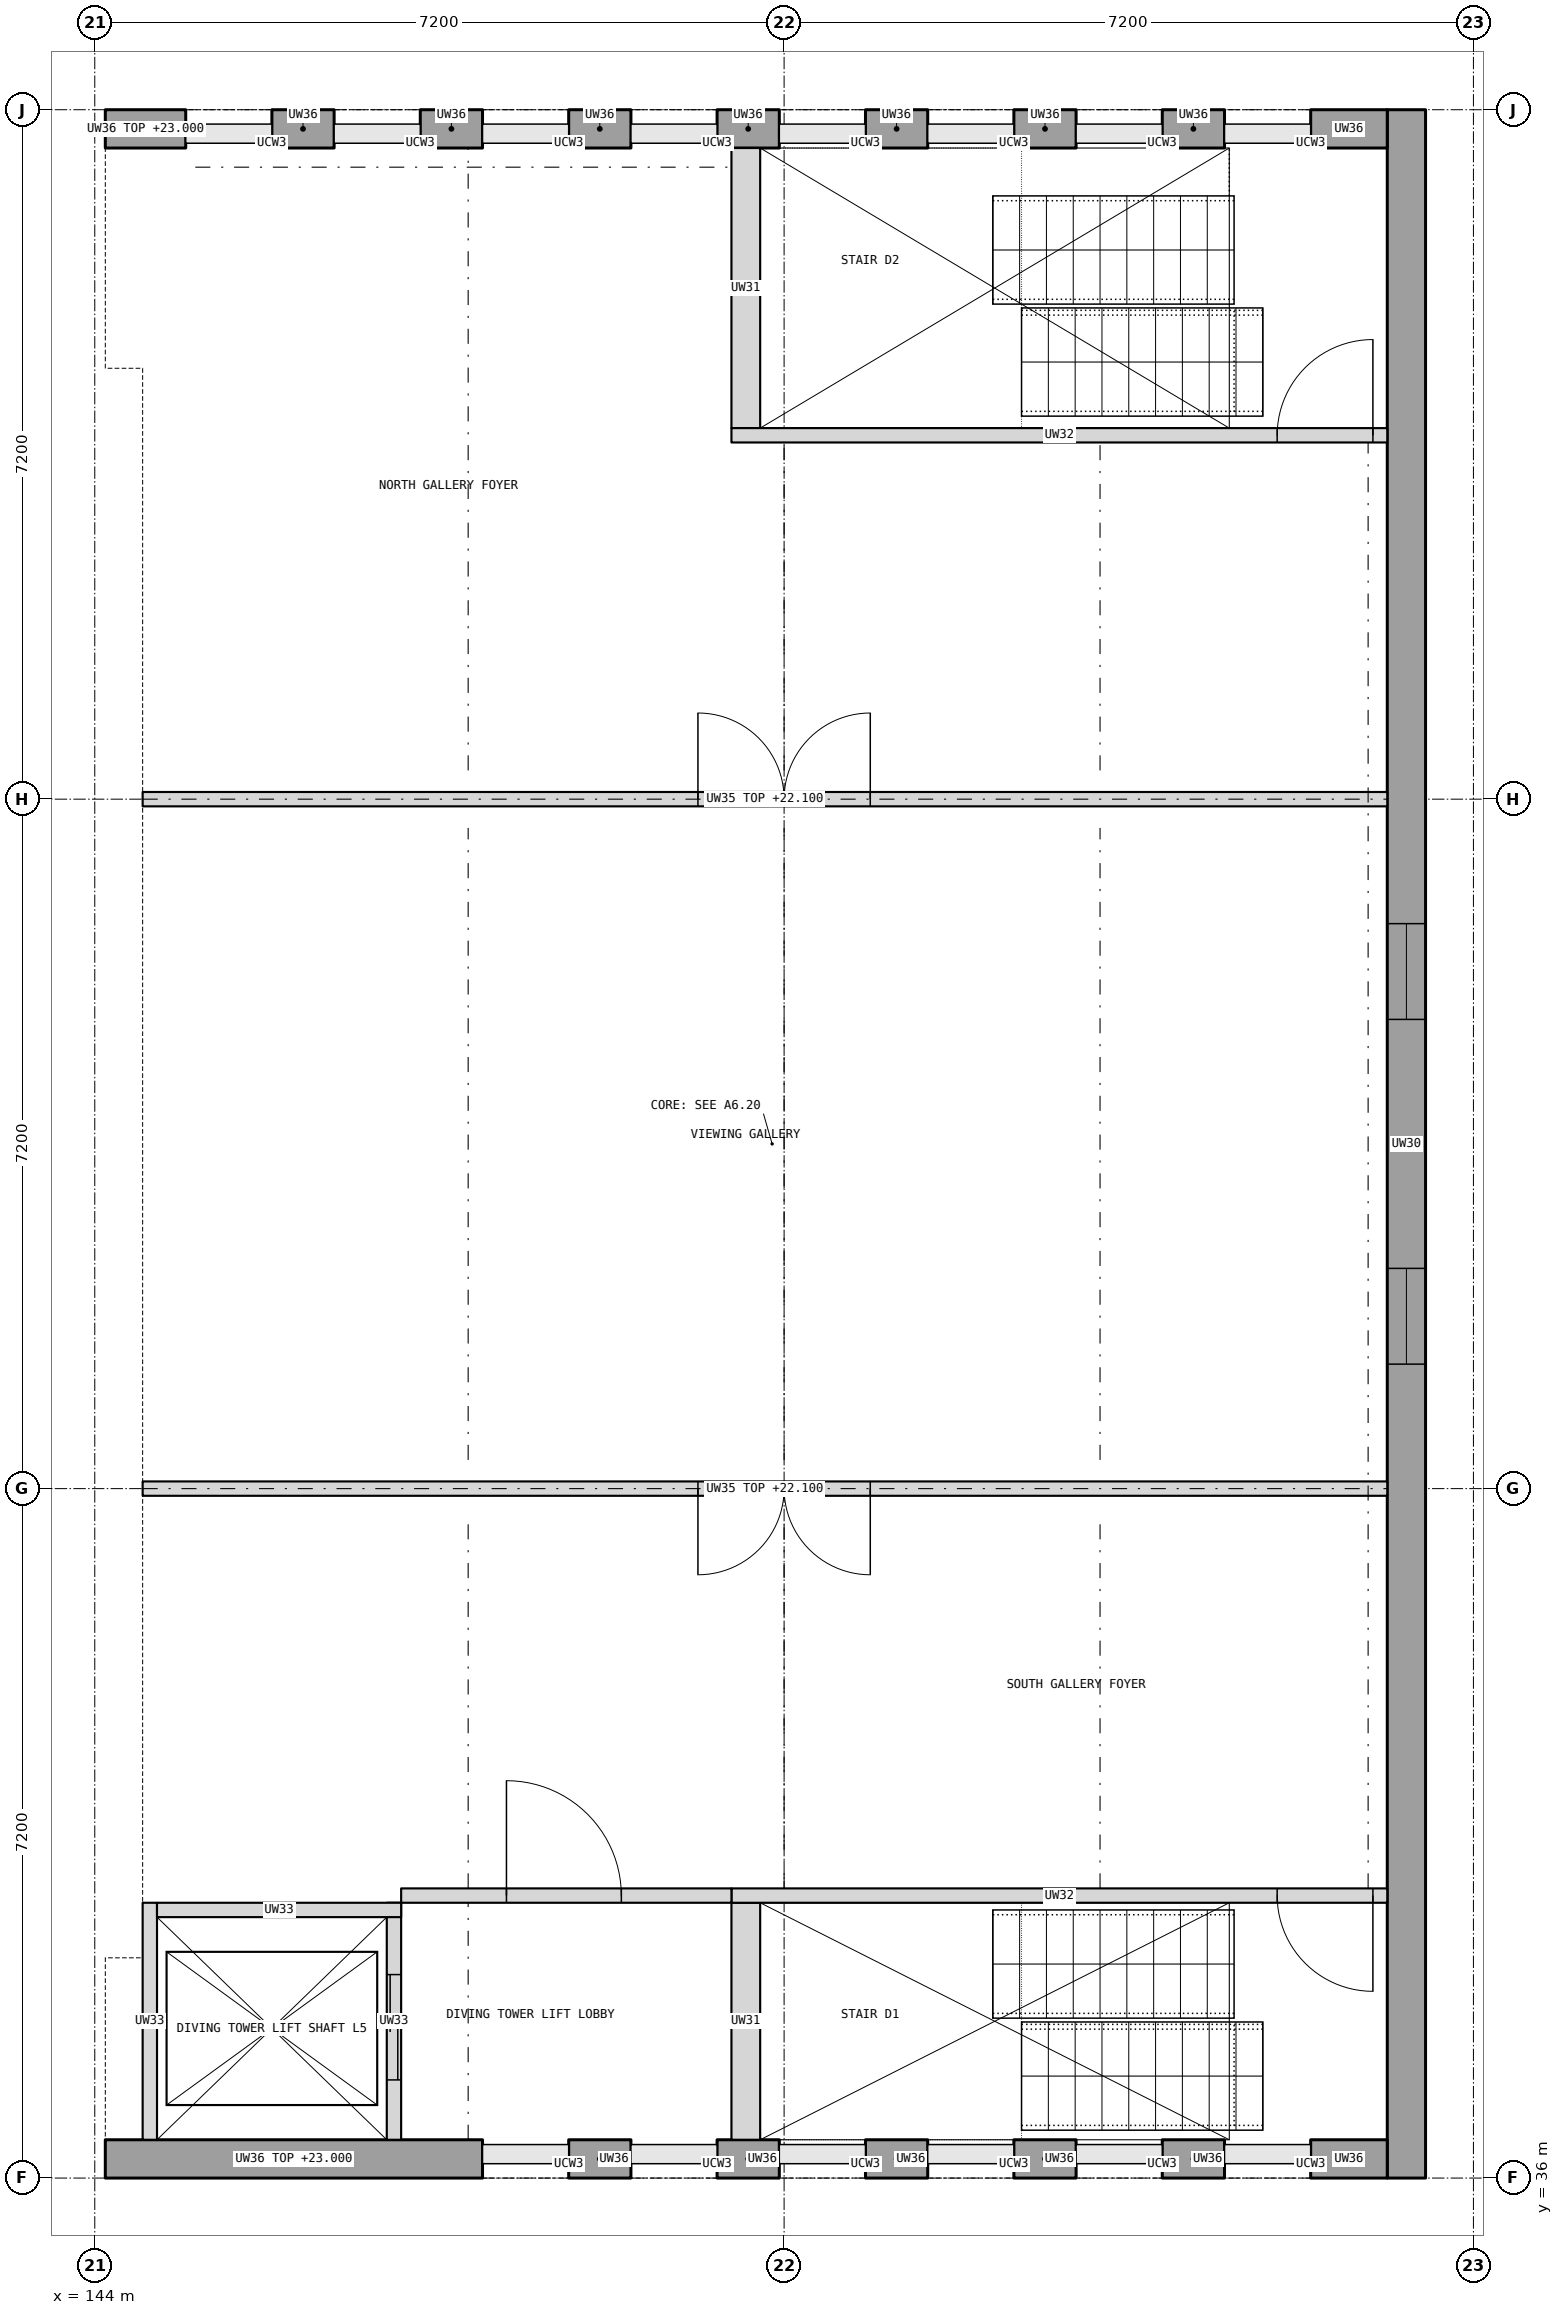
"""IFC4 building model, lengths in metres.
Left out: names, types, materials, properties, quantities, classifications, styles, units other than length and angle.
Written with IfcOpenShell. Run it as: python <this file> out.ifc"""

import sys

from ifc_helpers import new_model, si_unit, direction, frame, frame_2d, origin, place, context, subcontext, project, spatial, rectangle, extrude, element, fill, save


model = new_model("IFC4")
c1 = context("Model", 3, precision=1e-05, world=origin(), true_north=direction((0.0, 1.0)))
c2 = subcontext(c1, "Body", "Model", "MODEL_VIEW")
j1 = project(units=[si_unit("LENGTHUNIT", "METRE"), si_unit("PLANEANGLEUNIT", "RADIAN")], contexts=[c1])
p1 = place(None, origin())
s1 = spatial("IfcSite", under=j1, at=p1, CompositionType="ELEMENT")
p2 = place(p1, origin())
s2 = spatial("IfcBuilding", under=s1, at=p2, CompositionType="ELEMENT")
p3 = place(p2, frame((0.0, 0.0, 19.9)))
s3 = spatial("IfcBuildingStorey", under=s2, at=p3, CompositionType="ELEMENT", Elevation=19.9)
p4 = place(p3, frame((157.7, 36.0, 0.0), z_axis=(0.0, 0.0, 1.0), x_axis=(0.0, 1.0, 0.0)))
e1 = element("IfcWall", 1, at=p4, inside=s3, PredefinedType="SHEAR", context=c2, shape_type="SweptSolid", body=[
    extrude(rectangle(XDim=21.6, YDim=0.4, at=frame_2d((10.8, 0.0))), origin(), (0.0, 0.0, 1.0), 3.1),
])
p5 = place(p4, frame((8.5, 0.0, 0.9)))
e2 = element("IfcOpeningElement", 2, at=p5, cuts=e1, PredefinedType="OPENING", context=c2, shape_type="SweptSolid", body=[
    extrude(rectangle(XDim=1.0, YDim=1.5, at=frame_2d((0.5, 0.75))), frame((0.0, 0.21, 0.0), z_axis=(0.0, -1.0, 0.0), x_axis=(1.0, 0.0, 0.0)), (0.0, 0.0, 1.0), 0.42),
])
p6 = place(p4, frame((12.1, 0.0, 0.9)))
e3 = element("IfcOpeningElement", 3, at=p6, cuts=e1, PredefinedType="OPENING", context=c2, shape_type="SweptSolid", body=[
    extrude(rectangle(XDim=1.0, YDim=1.5, at=frame_2d((0.5, 0.75))), frame((0.0, 0.21, 0.0), z_axis=(0.0, -1.0, 0.0), x_axis=(1.0, 0.0, 0.0)), (0.0, 0.0, 1.0), 0.42),
])
p7 = place(p3, frame((144.11, 36.2, 0.0), z_axis=(0.0, 0.0, 1.0), x_axis=(1.0, 0.0, 0.0)))
e4 = element("IfcWall", 4, at=p7, inside=s3, PredefinedType="SOLIDWALL", context=c2, shape_type="SweptSolid", body=[
    extrude(rectangle(XDim=3.94, YDim=0.4, at=frame_2d((1.97, 0.0))), origin(), (0.0, 0.0, 1.0), 3.1),
])
p8 = place(p3, frame((148.95, 36.2, 0.0), z_axis=(0.0, 0.0, 1.0), x_axis=(1.0, 0.0, 0.0)))
e5 = element("IfcWall", 5, at=p8, inside=s3, PredefinedType="SOLIDWALL", context=c2, shape_type="SweptSolid", body=[
    extrude(rectangle(XDim=0.65, YDim=0.4, at=frame_2d((0.325, 0.0))), origin(), (0.0, 0.0, 1.0), 3.1),
])
for number, where, z_axis, x_axis in (
    (6, (150.5, 36.2, 0.0), (0.0, 0.0, 1.0), (1.0, 0.0, 0.0)),
    (7, (152.05, 36.2, 0.0), (0.0, 0.0, 1.0), (1.0, 0.0, 0.0)),
    (8, (153.6, 36.2, 0.0), (0.0, 0.0, 1.0), (1.0, 0.0, 0.0)),
):
    element("IfcWall", number, at=place(p3, frame(where, z_axis=z_axis, x_axis=x_axis)), inside=s3, PredefinedType="SOLIDWALL", context=c2, shape_type="SweptSolid", body=[
        extrude(rectangle(XDim=0.65, YDim=0.4, at=frame_2d((0.325, 0.0))), origin(), (0.0, 0.0, 1.0), 3.1),
    ])
p9 = place(p3, frame((155.15, 36.2, 0.0), z_axis=(0.0, 0.0, 1.0), x_axis=(1.0, 0.0, 0.0)))
e9 = element("IfcWall", 9, at=p9, inside=s3, PredefinedType="SOLIDWALL", context=c2, shape_type="SweptSolid", body=[
    extrude(rectangle(XDim=0.65, YDim=0.4, at=frame_2d((0.325, 0.0))), origin(), (0.0, 0.0, 1.0), 3.1),
])
p10 = place(p3, frame((156.7, 36.2, 0.0), z_axis=(0.0, 0.0, 1.0), x_axis=(1.0, 0.0, 0.0)))
e10 = element("IfcWall", 10, at=p10, inside=s3, PredefinedType="SOLIDWALL", context=c2, shape_type="SweptSolid", body=[
    extrude(rectangle(XDim=0.8, YDim=0.4, at=frame_2d((0.4, 0.0))), origin(), (0.0, 0.0, 1.0), 3.1),
])
p11 = place(p3, frame((144.11, 57.4, 0.0), z_axis=(0.0, 0.0, 1.0), x_axis=(1.0, 0.0, 0.0)))
e11 = element("IfcWall", 11, at=p11, inside=s3, PredefinedType="SOLIDWALL", context=c2, shape_type="SweptSolid", body=[
    extrude(rectangle(XDim=0.84, YDim=0.4, at=frame_2d((0.42, 0.0))), origin(), (0.0, 0.0, 1.0), 3.1),
])
p12 = place(p3, frame((145.85, 57.4, 0.0), z_axis=(0.0, 0.0, 1.0), x_axis=(1.0, 0.0, 0.0)))
e12 = element("IfcWall", 12, at=p12, inside=s3, PredefinedType="SOLIDWALL", context=c2, shape_type="SweptSolid", body=[
    extrude(rectangle(XDim=0.65, YDim=0.4, at=frame_2d((0.325, 0.0))), origin(), (0.0, 0.0, 1.0), 3.1),
])
for number, where, z_axis, x_axis in (
    (13, (147.4, 57.4, 0.0), (0.0, 0.0, 1.0), (1.0, 0.0, 0.0)),
    (14, (148.95, 57.4, 0.0), (0.0, 0.0, 1.0), (1.0, 0.0, 0.0)),
):
    element("IfcWall", number, at=place(p3, frame(where, z_axis=z_axis, x_axis=x_axis)), inside=s3, PredefinedType="SOLIDWALL", context=c2, shape_type="SweptSolid", body=[
        extrude(rectangle(XDim=0.65, YDim=0.4, at=frame_2d((0.325, 0.0))), origin(), (0.0, 0.0, 1.0), 3.1),
    ])
for number, where, z_axis, x_axis in (
    (15, (150.5, 57.4, 0.0), (0.0, 0.0, 1.0), (1.0, 0.0, 0.0)),
    (16, (152.05, 57.4, 0.0), (0.0, 0.0, 1.0), (1.0, 0.0, 0.0)),
    (17, (153.6, 57.4, 0.0), (0.0, 0.0, 1.0), (1.0, 0.0, 0.0)),
):
    element("IfcWall", number, at=place(p3, frame(where, z_axis=z_axis, x_axis=x_axis)), inside=s3, PredefinedType="SOLIDWALL", context=c2, shape_type="SweptSolid", body=[
        extrude(rectangle(XDim=0.65, YDim=0.4, at=frame_2d((0.325, 0.0))), origin(), (0.0, 0.0, 1.0), 3.1),
    ])
p13 = place(p3, frame((155.15, 57.4, 0.0), z_axis=(0.0, 0.0, 1.0), x_axis=(1.0, 0.0, 0.0)))
e18 = element("IfcWall", 18, at=p13, inside=s3, PredefinedType="SOLIDWALL", context=c2, shape_type="SweptSolid", body=[
    extrude(rectangle(XDim=0.65, YDim=0.4, at=frame_2d((0.325, 0.0))), origin(), (0.0, 0.0, 1.0), 3.1),
])
p14 = place(p3, frame((156.7, 57.4, 0.0), z_axis=(0.0, 0.0, 1.0), x_axis=(1.0, 0.0, 0.0)))
e19 = element("IfcWall", 19, at=p14, inside=s3, PredefinedType="SOLIDWALL", context=c2, shape_type="SweptSolid", body=[
    extrude(rectangle(XDim=0.8, YDim=0.4, at=frame_2d((0.4, 0.0))), origin(), (0.0, 0.0, 1.0), 3.1),
])
p15 = place(p3, frame((150.8, 36.4, 0.0), z_axis=(0.0, 0.0, 1.0), x_axis=(0.0, 1.0, 0.0)))
e20 = element("IfcWall", 20, at=p15, inside=s3, PredefinedType="SHEAR", context=c2, shape_type="SweptSolid", body=[
    extrude(rectangle(XDim=2.475, YDim=0.3, at=frame_2d((1.238, 0.0))), origin(), (0.0, 0.0, 1.0), 3.1),
])
p16 = place(p3, frame((150.65, 38.95, 0.0), z_axis=(0.0, 0.0, 1.0), x_axis=(1.0, 0.0, 0.0)))
e21 = element("IfcWall", 21, at=p16, inside=s3, PredefinedType="SHEAR", context=c2, shape_type="SweptSolid", body=[
    extrude(rectangle(XDim=6.85, YDim=0.15, at=frame_2d((3.425, 0.0))), origin(), (0.0, 0.0, 1.0), 3.1),
])
p17 = place(p16, frame((5.7, 0.0, 0.0)))
e22 = element("IfcOpeningElement", 22, at=p17, cuts=e21, PredefinedType="OPENING", context=c2, shape_type="SweptSolid", body=[
    extrude(rectangle(XDim=1.0, YDim=2.1, at=frame_2d((0.5, 1.05))), frame((0.0, 0.085, 0.0), z_axis=(0.0, -1.0, 0.0), x_axis=(1.0, 0.0, 0.0)), (0.0, 0.0, 1.0), 0.17),
])
p18 = place(p3, frame((150.8, 54.275, 0.0), z_axis=(0.0, 0.0, 1.0), x_axis=(0.0, 1.0, 0.0)))
e23 = element("IfcWall", 23, at=p18, inside=s3, PredefinedType="SHEAR", context=c2, shape_type="SweptSolid", body=[
    extrude(rectangle(XDim=2.925, YDim=0.3, at=frame_2d((1.462, 0.0))), origin(), (0.0, 0.0, 1.0), 3.1),
])
p19 = place(p3, frame((150.65, 54.2, 0.0), z_axis=(0.0, 0.0, 1.0), x_axis=(1.0, 0.0, 0.0)))
e24 = element("IfcWall", 24, at=p19, inside=s3, PredefinedType="SHEAR", context=c2, shape_type="SweptSolid", body=[
    extrude(rectangle(XDim=6.85, YDim=0.15, at=frame_2d((3.425, 0.0))), origin(), (0.0, 0.0, 1.0), 3.1),
])
p20 = place(p19, frame((5.7, 0.0, 0.0)))
e25 = element("IfcOpeningElement", 25, at=p20, cuts=e24, PredefinedType="OPENING", context=c2, shape_type="SweptSolid", body=[
    extrude(rectangle(XDim=1.0, YDim=2.1, at=frame_2d((0.5, 1.05))), frame((0.0, 0.085, 0.0), z_axis=(0.0, -1.0, 0.0), x_axis=(1.0, 0.0, 0.0)), (0.0, 0.0, 1.0), 0.17),
])
p21 = place(p3, frame((144.575, 36.4, 0.0), z_axis=(0.0, 0.0, 1.0), x_axis=(0.0, 1.0, 0.0)))
e26 = element("IfcWall", 26, at=p21, inside=s3, PredefinedType="PARTITIONING", context=c2, shape_type="SweptSolid", body=[
    extrude(rectangle(XDim=2.475, YDim=0.15, at=frame_2d((1.238, 0.0))), origin(), (0.0, 0.0, 1.0), 3.1),
])
p22 = place(p3, frame((147.125, 36.4, 0.0), z_axis=(0.0, 0.0, 1.0), x_axis=(0.0, 1.0, 0.0)))
e27 = element("IfcWall", 27, at=p22, inside=s3, PredefinedType="PARTITIONING", context=c2, shape_type="SweptSolid", body=[
    extrude(rectangle(XDim=2.475, YDim=0.15, at=frame_2d((1.238, 0.0))), origin(), (0.0, 0.0, 1.0), 3.1),
])
p23 = place(p22, frame((0.625, 0.0, 0.0)))
e28 = element("IfcOpeningElement", 28, at=p23, cuts=e27, PredefinedType="OPENING", context=c2, shape_type="SweptSolid", body=[
    extrude(rectangle(XDim=1.1, YDim=2.1, at=frame_2d((0.55, 1.05))), frame((0.0, 0.085, 0.0), z_axis=(0.0, -1.0, 0.0), x_axis=(1.0, 0.0, 0.0)), (0.0, 0.0, 1.0), 0.17),
])
p24 = place(p3, frame((144.65, 38.8, 0.0), z_axis=(0.0, 0.0, 1.0), x_axis=(1.0, 0.0, 0.0)))
e29 = element("IfcWall", 29, at=p24, inside=s3, PredefinedType="PARTITIONING", context=c2, shape_type="SweptSolid", body=[
    extrude(rectangle(XDim=2.55, YDim=0.15, at=frame_2d((1.275, 0.0))), origin(), (0.0, 0.0, 1.0), 3.1),
])
p25 = place(p3, frame((147.2, 38.95, 0.0), z_axis=(0.0, 0.0, 1.0), x_axis=(1.0, 0.0, 0.0)))
e30 = element("IfcWall", 30, at=p25, inside=s3, PredefinedType="SHEAR", context=c2, shape_type="SweptSolid", body=[
    extrude(rectangle(XDim=3.45, YDim=0.15, at=frame_2d((1.725, 0.0))), origin(), (0.0, 0.0, 1.0), 3.1),
])
p26 = place(p25, frame((1.1, 0.0, 0.0)))
e31 = element("IfcOpeningElement", 31, at=p26, cuts=e30, PredefinedType="OPENING", context=c2, shape_type="SweptSolid", body=[
    extrude(rectangle(XDim=1.2, YDim=2.1, at=frame_2d((0.6, 1.05))), frame((0.0, 0.085, 0.0), z_axis=(0.0, -1.0, 0.0), x_axis=(1.0, 0.0, 0.0)), (0.0, 0.0, 1.0), 0.17),
])
p27 = place(p3, frame((144.5, 43.2, 0.0), z_axis=(0.0, 0.0, 1.0), x_axis=(1.0, 0.0, 0.0)))
e32 = element("IfcWall", 32, at=p27, inside=s3, PredefinedType="PARTITIONING", context=c2, shape_type="SweptSolid", body=[
    extrude(rectangle(XDim=13.0, YDim=0.15, at=frame_2d((6.5, 0.0))), origin(), (0.0, 0.0, 1.0), 2.2),
])
p28 = place(p27, frame((5.8, 0.0, 0.0)))
e33 = element("IfcOpeningElement", 33, at=p28, cuts=e32, PredefinedType="OPENING", context=c2, shape_type="SweptSolid", body=[
    extrude(rectangle(XDim=1.8, YDim=2.1, at=frame_2d((0.9, 1.05))), frame((0.0, 0.085, 0.0), z_axis=(0.0, -1.0, 0.0), x_axis=(1.0, 0.0, 0.0)), (0.0, 0.0, 1.0), 0.17),
])
p29 = place(p3, frame((144.5, 50.4, 0.0), z_axis=(0.0, 0.0, 1.0), x_axis=(1.0, 0.0, 0.0)))
e34 = element("IfcWall", 34, at=p29, inside=s3, PredefinedType="PARTITIONING", context=c2, shape_type="SweptSolid", body=[
    extrude(rectangle(XDim=13.0, YDim=0.15, at=frame_2d((6.5, 0.0))), origin(), (0.0, 0.0, 1.0), 2.2),
])
p30 = place(p29, frame((5.8, 0.0, 0.0)))
e35 = element("IfcOpeningElement", 35, at=p30, cuts=e34, PredefinedType="OPENING", context=c2, shape_type="SweptSolid", body=[
    extrude(rectangle(XDim=1.8, YDim=2.1, at=frame_2d((0.9, 1.05))), frame((0.0, 0.085, 0.0), z_axis=(0.0, -1.0, 0.0), x_axis=(1.0, 0.0, 0.0)), (0.0, 0.0, 1.0), 0.17),
])
p31 = place(p5, origin())
e36 = element("IfcWindow", 36, at=p31, inside=s3, PartitioningType="SINGLE_PANEL", PredefinedType="WINDOW", context=c2, shape_type="SweptSolid", body=[
    extrude(rectangle(XDim=1.0, YDim=1.5, at=frame_2d((0.5, 0.75))), frame((0.0, 0.03, 0.0), z_axis=(0.0, -1.0, 0.0), x_axis=(1.0, 0.0, 0.0)), (0.0, 0.0, 1.0), 0.06),
])
fill(e2, e36)
p32 = place(p6, origin())
e37 = element("IfcWindow", 37, at=p32, inside=s3, PartitioningType="SINGLE_PANEL", PredefinedType="WINDOW", context=c2, shape_type="SweptSolid", body=[
    extrude(rectangle(XDim=1.0, YDim=1.5, at=frame_2d((0.5, 0.75))), frame((0.0, 0.03, 0.0), z_axis=(0.0, -1.0, 0.0), x_axis=(1.0, 0.0, 0.0)), (0.0, 0.0, 1.0), 0.06),
])
fill(e3, e37)
p33 = place(p17, frame((1.0, 0.0, 0.0), z_axis=(0.0, 0.0, 1.0), x_axis=(-1.0, 0.0, 0.0)))
e38 = element("IfcDoor", 38, at=p33, inside=s3, OperationType="SINGLE_SWING_LEFT", PredefinedType="DOOR", context=c2, shape_type="SweptSolid", body=[
    extrude(rectangle(XDim=1.0, YDim=2.1, at=frame_2d((0.5, 1.05))), frame((0.0, 0.025, 0.0), z_axis=(0.0, -1.0, 0.0), x_axis=(1.0, 0.0, 0.0)), (0.0, 0.0, 1.0), 0.05),
])
fill(e22, e38)
p34 = place(p20, origin())
e39 = element("IfcDoor", 39, at=p34, inside=s3, OperationType="SINGLE_SWING_RIGHT", PredefinedType="DOOR", context=c2, shape_type="SweptSolid", body=[
    extrude(rectangle(XDim=1.0, YDim=2.1, at=frame_2d((0.5, 1.05))), frame((0.0, 0.025, 0.0), z_axis=(0.0, -1.0, 0.0), x_axis=(1.0, 0.0, 0.0)), (0.0, 0.0, 1.0), 0.05),
])
fill(e25, e39)
p35 = place(p26, origin())
e40 = element("IfcDoor", 40, at=p35, inside=s3, OperationType="SINGLE_SWING_LEFT", PredefinedType="DOOR", context=c2, shape_type="SweptSolid", body=[
    extrude(rectangle(XDim=1.2, YDim=2.1, at=frame_2d((0.6, 1.05))), frame((0.0, 0.025, 0.0), z_axis=(0.0, -1.0, 0.0), x_axis=(1.0, 0.0, 0.0)), (0.0, 0.0, 1.0), 0.05),
])
fill(e31, e40)
p36 = place(p28, frame((1.8, 0.0, 0.0), z_axis=(0.0, 0.0, 1.0), x_axis=(-1.0, 0.0, 0.0)))
e41 = element("IfcDoor", 41, at=p36, inside=s3, OperationType="DOUBLE_DOOR_SINGLE_SWING", PredefinedType="DOOR", context=c2, shape_type="SweptSolid", body=[
    extrude(rectangle(XDim=1.8, YDim=2.1, at=frame_2d((0.9, 1.05))), frame((0.0, 0.025, 0.0), z_axis=(0.0, -1.0, 0.0), x_axis=(1.0, 0.0, 0.0)), (0.0, 0.0, 1.0), 0.05),
])
fill(e33, e41)
p37 = place(p30, origin())
e42 = element("IfcDoor", 42, at=p37, inside=s3, OperationType="DOUBLE_DOOR_SINGLE_SWING", PredefinedType="DOOR", context=c2, shape_type="SweptSolid", body=[
    extrude(rectangle(XDim=1.8, YDim=2.1, at=frame_2d((0.9, 1.05))), frame((0.0, 0.025, 0.0), z_axis=(0.0, -1.0, 0.0), x_axis=(1.0, 0.0, 0.0)), (0.0, 0.0, 1.0), 0.05),
])
fill(e35, e42)
p38 = place(p23, origin())
e43 = element("IfcDoor", 43, at=p38, inside=s3, OperationType="DOUBLE_DOOR_SLIDING", PredefinedType="DOOR", context=c2, shape_type="SweptSolid", body=[
    extrude(rectangle(XDim=1.1, YDim=2.1, at=frame_2d((0.55, 1.05))), frame((0.0, 0.025, 0.0), z_axis=(0.0, -1.0, 0.0), x_axis=(1.0, 0.0, 0.0)), (0.0, 0.0, 1.0), 0.05),
])
fill(e28, e43)
save(model, sys.argv[1])
